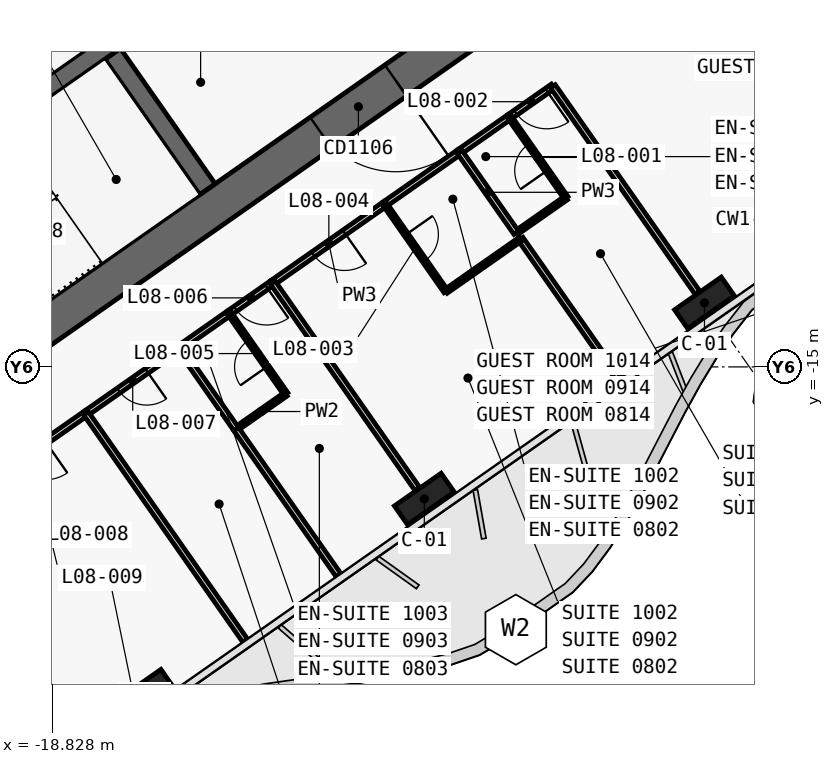
"""IFC4 building model, lengths in metres.
Left out: names, types, materials, properties, quantities, classifications, styles, units other than length and angle.
Written with IfcOpenShell. Run it as: python <this file> out.ifc"""

import sys

from ifc_helpers import new_model, si_unit, direction, frame, frame_2d, origin, origin_2d, place, context, subcontext, project, spatial, polyline, rectangle, outline, extrude, element, fill, save


model = new_model("IFC4")
c1 = context("Model", 3, precision=1e-05, world=origin(), true_north=direction((0.0, 1.0)))
c2 = subcontext(c1, "Body", "Model", "MODEL_VIEW")
j1 = project(units=[si_unit("LENGTHUNIT", "METRE"), si_unit("PLANEANGLEUNIT", "RADIAN")], contexts=[c1])
p1 = place(None, origin())
s1 = spatial("IfcSite", under=j1, at=p1, CompositionType="ELEMENT")
p2 = place(p1, origin())
s2 = spatial("IfcBuilding", under=s1, at=p2, CompositionType="ELEMENT")
p3 = place(p2, frame((0.0, 0.0, 54.5)))
s3 = spatial("IfcBuildingStorey", under=s2, at=p3, CompositionType="ELEMENT", Elevation=54.5)
p4 = place(p3, frame((0.037, 11.867, 0.0), z_axis=(0.0, 0.0, 1.0), x_axis=(-0.819155306259, -0.573571777746, 0.0)))
e1 = element("IfcWall", 1, at=p4, inside=s3, PredefinedType="SHEAR", context=c2, shape_type="SweptSolid", body=[
    extrude(outline(polyline([(33.837, 0.5), (0.7, 0.5), (0.0, -0.5), (33.837, -0.5), (33.837, 0.5)])), origin(), (0.0, 0.0, 1.0), 3.6),
])
p5 = place(p3, frame((0.037, -0.585, 0.0), z_axis=(0.0, 0.0, 1.0), x_axis=(-0.819157152511, -0.573569140985, 0.0)))
e2 = element("IfcWall", 2, at=p5, inside=s3, PredefinedType="SHEAR", context=c2, shape_type="SweptSolid", body=[
    extrude(outline(polyline([(26.695, 0.5), (0.7, 0.5), (0.0, -0.5), (26.695, -0.5), (26.695, 0.5)])), origin(), (0.0, 0.0, 1.0), 3.6),
])
p6 = place(p5, frame((2.995, 0.0, 0.0)))
e3 = element("IfcOpeningElement", 3, at=p6, cuts=e2, PredefinedType="OPENING", context=c2, shape_type="SweptSolid", body=[
    extrude(rectangle(XDim=2.4, YDim=2.1, at=frame_2d((1.2, 1.05))), frame((0.0, 0.51, 0.0), z_axis=(0.0, -1.0, 0.0), x_axis=(1.0, 0.0, 0.0)), (0.0, 0.0, 1.0), 1.02),
])
p7 = place(p5, frame((11.995, 0.0, 0.0)))
e4 = element("IfcOpeningElement", 4, at=p7, cuts=e2, PredefinedType="OPENING", context=c2, shape_type="SweptSolid", body=[
    extrude(rectangle(XDim=2.4, YDim=2.1, at=frame_2d((1.2, 1.05))), frame((0.0, 0.51, 0.0), z_axis=(0.0, -1.0, 0.0), x_axis=(1.0, 0.0, 0.0)), (0.0, 0.0, 1.0), 1.02),
])
p8 = place(p3, frame((-14.745, -10.324, 0.0), z_axis=(0.0, 0.0, 1.0), x_axis=(-0.57356780395, 0.819158088694, 0.0)))
e5 = element("IfcWall", 5, at=p8, inside=s3, PredefinedType="SHEAR", context=c2, shape_type="SweptSolid", body=[
    extrude(outline(polyline([(4.35, 0.25), (0.0, 0.25), (0.0, -0.25), (4.35, -0.25), (4.35, 0.25)])), origin(), (0.0, 0.0, 1.0), 3.6),
])
p9 = place(p3, frame((-2.638, 3.768, 0.0), z_axis=(0.0, 0.0, 1.0), x_axis=(-0.819148977158, -0.573580816643, 0.0)))
e6 = element("IfcWall", 6, at=p9, inside=s3, PredefinedType="SHEAR", context=c2, shape_type="SweptSolid", body=[
    extrude(outline(polyline([(26.0, 0.25), (0.0, 0.25), (0.0, -0.25), (26.0, -0.25), (26.0, 0.25)])), origin(), (0.0, 0.0, 1.0), 3.6),
])
p10 = place(p9, frame((1.169, 0.0, 0.0)))
e7 = element("IfcOpeningElement", 7, at=p10, cuts=e6, PredefinedType="OPENING", context=c2, shape_type="SweptSolid", body=[
    extrude(rectangle(XDim=1.1, YDim=2.1, at=frame_2d((0.55, 1.05))), frame((0.0, 0.26, 0.0), z_axis=(0.0, -1.0, 0.0), x_axis=(1.0, 0.0, 0.0)), (0.0, 0.0, 1.0), 0.52),
])
p11 = place(p9, frame((3.206, 0.0, 0.0)))
e8 = element("IfcOpeningElement", 8, at=p11, cuts=e6, PredefinedType="OPENING", context=c2, shape_type="SweptSolid", body=[
    extrude(rectangle(XDim=1.1, YDim=2.1, at=frame_2d((0.55, 1.05))), frame((0.0, 0.26, 0.0), z_axis=(0.0, -1.0, 0.0), x_axis=(1.0, 0.0, 0.0)), (0.0, 0.0, 1.0), 0.52),
])
p12 = place(p9, frame((5.244, 0.0, 0.0)))
e9 = element("IfcOpeningElement", 9, at=p12, cuts=e6, PredefinedType="OPENING", context=c2, shape_type="SweptSolid", body=[
    extrude(rectangle(XDim=1.1, YDim=2.1, at=frame_2d((0.55, 1.05))), frame((0.0, 0.26, 0.0), z_axis=(0.0, -1.0, 0.0), x_axis=(1.0, 0.0, 0.0)), (0.0, 0.0, 1.0), 0.52),
])
p13 = place(p9, frame((7.281, 0.0, 0.0)))
e10 = element("IfcOpeningElement", 10, at=p13, cuts=e6, PredefinedType="OPENING", context=c2, shape_type="SweptSolid", body=[
    extrude(rectangle(XDim=1.1, YDim=2.1, at=frame_2d((0.55, 1.05))), frame((0.0, 0.26, 0.0), z_axis=(0.0, -1.0, 0.0), x_axis=(1.0, 0.0, 0.0)), (0.0, 0.0, 1.0), 0.52),
])
p14 = place(p9, frame((9.688, 0.0, 0.0)))
e11 = element("IfcOpeningElement", 11, at=p14, cuts=e6, PredefinedType="OPENING", context=c2, shape_type="SweptSolid", body=[
    extrude(rectangle(XDim=1.1, YDim=2.1, at=frame_2d((0.55, 1.05))), frame((0.0, 0.26, 0.0), z_axis=(0.0, -1.0, 0.0), x_axis=(1.0, 0.0, 0.0)), (0.0, 0.0, 1.0), 0.52),
])
p15 = place(p9, frame((11.863, 0.0, 0.0)))
e12 = element("IfcOpeningElement", 12, at=p15, cuts=e6, PredefinedType="OPENING", context=c2, shape_type="SweptSolid", body=[
    extrude(rectangle(XDim=1.1, YDim=2.1, at=frame_2d((0.55, 1.05))), frame((0.0, 0.26, 0.0), z_axis=(0.0, -1.0, 0.0), x_axis=(1.0, 0.0, 0.0)), (0.0, 0.0, 1.0), 0.52),
])
p16 = place(p9, frame((14.038, 0.0, 0.0)))
e13 = element("IfcOpeningElement", 13, at=p16, cuts=e6, PredefinedType="OPENING", context=c2, shape_type="SweptSolid", body=[
    extrude(rectangle(XDim=1.1, YDim=2.1, at=frame_2d((0.55, 1.05))), frame((0.0, 0.26, 0.0), z_axis=(0.0, -1.0, 0.0), x_axis=(1.0, 0.0, 0.0)), (0.0, 0.0, 1.0), 0.52),
])
p17 = place(p9, frame((16.212, 0.0, 0.0)))
e14 = element("IfcOpeningElement", 14, at=p17, cuts=e6, PredefinedType="OPENING", context=c2, shape_type="SweptSolid", body=[
    extrude(rectangle(XDim=1.1, YDim=2.1, at=frame_2d((0.55, 1.05))), frame((0.0, 0.26, 0.0), z_axis=(0.0, -1.0, 0.0), x_axis=(1.0, 0.0, 0.0)), (0.0, 0.0, 1.0), 0.52),
])
for number, where, z_axis, x_axis in (
    (15, (-1.665, -13.313, 0.0), (0.0, 0.0, 1.0), (-0.819, -0.574, 0.0)),
    (16, (-9.038, -18.475, 0.0), (0.0, 0.0, 1.0), (-0.819, -0.574, 0.0)),
    (17, (-16.41, -23.637, 0.0), (0.0, 0.0, 1.0), (-0.819, -0.574, 0.0)),
):
    element("IfcColumn", number, at=place(p3, frame(where, z_axis=z_axis, x_axis=x_axis)), inside=s3, PredefinedType="COLUMN", context=c2, shape_type="SweptSolid", body=[
        extrude(rectangle(XDim=1.5, YDim=0.6, at=origin_2d()), origin(), (0.0, 0.0, 1.0), 3.6),
    ])
p18 = place(p3, frame((-5.652, -7.62, 0.0), z_axis=(0.0, 0.0, 1.0), x_axis=(-0.819207359301, -0.573497430219, 0.0)))
e18 = element("IfcWall", 18, at=p18, inside=s3, PredefinedType="PARTITIONING", context=c2, shape_type="SweptSolid", body=[
    extrude(rectangle(XDim=1.401, YDim=0.15, at=frame_2d((0.7, 0.0))), origin(), (0.0, 0.0, 1.0), 2.6),
])
p19 = place(p18, frame((0.2, 0.0, 0.0)))
e19 = element("IfcOpeningElement", 19, at=p19, cuts=e18, PredefinedType="OPENING", context=c2, shape_type="SweptSolid", body=[
    extrude(rectangle(XDim=1.0, YDim=2.1, at=frame_2d((0.5, 1.05))), frame((0.0, 0.085, 0.0), z_axis=(0.0, -1.0, 0.0), x_axis=(1.0, 0.0, 0.0)), (0.0, 0.0, 1.0), 0.17),
])
p20 = place(p3, frame((-6.797, -8.421, 0.0), z_axis=(0.0, 0.0, 1.0), x_axis=(-0.8190674132, -0.573697283098, 0.0)))
e20 = element("IfcWall", 20, at=p20, inside=s3, PredefinedType="PARTITIONING", context=c2, shape_type="SweptSolid", body=[
    extrude(rectangle(XDim=1.604, YDim=0.15, at=frame_2d((0.802, 0.0))), origin(), (0.0, 0.0, 1.0), 3.32),
])
p21 = place(p3, frame((-10.074, -10.716, 0.0), z_axis=(0.0, 0.0, 1.0), x_axis=(-0.819145961204, -0.573585123798, 0.0)))
e21 = element("IfcWall", 21, at=p21, inside=s3, PredefinedType="PARTITIONING", context=c2, shape_type="SweptSolid", body=[
    extrude(rectangle(XDim=3.603, YDim=0.15, at=frame_2d((1.802, 0.0))), origin(), (0.0, 0.0, 1.0), 2.6),
])
p22 = place(p21, frame((1.301, 0.0, 0.0)))
e22 = element("IfcOpeningElement", 22, at=p22, cuts=e21, PredefinedType="OPENING", context=c2, shape_type="SweptSolid", body=[
    extrude(rectangle(XDim=1.0, YDim=2.1, at=frame_2d((0.5, 1.05))), frame((0.0, 0.085, 0.0), z_axis=(0.0, -1.0, 0.0), x_axis=(1.0, 0.0, 0.0)), (0.0, 0.0, 1.0), 0.17),
])
p23 = place(p3, frame((-8.107, -9.339, 0.0), z_axis=(0.0, 0.0, 1.0), x_axis=(-0.819146032251, -0.573585022335, 0.0)))
e23 = element("IfcWall", 23, at=p23, inside=s3, PredefinedType="PARTITIONING", context=c2, shape_type="SweptSolid", body=[
    extrude(rectangle(XDim=2.404, YDim=0.15, at=frame_2d((1.202, 0.0))), origin(), (0.0, 0.0, 1.0), 3.32),
])
p24 = place(p3, frame((-13.022, -12.781, 0.0), z_axis=(0.0, 0.0, 1.0), x_axis=(-0.81914197737, -0.573590813132, 0.0)))
e24 = element("IfcWall", 24, at=p24, inside=s3, PredefinedType="PARTITIONING", context=c2, shape_type="SweptSolid", body=[
    extrude(rectangle(XDim=1.403, YDim=0.15, at=frame_2d((0.701, 0.0))), origin(), (0.0, 0.0, 1.0), 2.6),
])
p25 = place(p24, frame((0.202, 0.0, 0.0)))
e25 = element("IfcOpeningElement", 25, at=p25, cuts=e24, PredefinedType="OPENING", context=c2, shape_type="SweptSolid", body=[
    extrude(rectangle(XDim=1.0, YDim=2.1, at=frame_2d((0.5, 1.05))), frame((0.0, 0.085, 0.0), z_axis=(0.0, -1.0, 0.0), x_axis=(1.0, 0.0, 0.0)), (0.0, 0.0, 1.0), 0.17),
])
p26 = place(p3, frame((-14.169, -13.584, 0.0), z_axis=(0.0, 0.0, 1.0), x_axis=(-0.819189013667, -0.573523634986, 0.0)))
e26 = element("IfcWall", 26, at=p26, inside=s3, PredefinedType="PARTITIONING", context=c2, shape_type="SweptSolid", body=[
    extrude(rectangle(XDim=1.604, YDim=0.15, at=frame_2d((0.802, 0.0))), origin(), (0.0, 0.0, 1.0), 3.32),
])
p27 = place(p3, frame((-15.48, -14.501, 0.0), z_axis=(0.0, 0.0, 1.0), x_axis=(-0.819193738533, -0.573516886193, 0.0)))
e27 = element("IfcWall", 27, at=p27, inside=s3, PredefinedType="PARTITIONING", context=c2, shape_type="SweptSolid", body=[
    extrude(rectangle(XDim=3.004, YDim=0.15, at=frame_2d((1.502, 0.0))), origin(), (0.0, 0.0, 1.0), 3.32),
])
p28 = place(p27, frame((1.052, 0.0, 0.0)))
e28 = element("IfcOpeningElement", 28, at=p28, cuts=e27, PredefinedType="OPENING", context=c2, shape_type="SweptSolid", body=[
    extrude(rectangle(XDim=0.9, YDim=2.1, at=frame_2d((0.45, 1.05))), frame((0.0, 0.085, 0.0), z_axis=(0.0, -1.0, 0.0), x_axis=(1.0, 0.0, 0.0)), (0.0, 0.0, 1.0), 0.17),
])
p29 = place(p3, frame((-17.937, -16.222, 0.0), z_axis=(0.0, 0.0, 1.0), x_axis=(-0.819145961204, -0.573585123798, 0.0)))
e29 = element("IfcWall", 29, at=p29, inside=s3, PredefinedType="PARTITIONING", context=c2, shape_type="SweptSolid", body=[
    extrude(rectangle(XDim=3.603, YDim=0.15, at=frame_2d((1.802, 0.0))), origin(), (0.0, 0.0, 1.0), 2.6),
])
p30 = place(p29, frame((1.302, 0.0, 0.0)))
e30 = element("IfcOpeningElement", 30, at=p30, cuts=e29, PredefinedType="OPENING", context=c2, shape_type="SweptSolid", body=[
    extrude(rectangle(XDim=1.0, YDim=2.1, at=frame_2d((0.5, 1.05))), frame((0.0, 0.085, 0.0), z_axis=(0.0, -1.0, 0.0), x_axis=(1.0, 0.0, 0.0)), (0.0, 0.0, 1.0), 0.17),
])
p31 = place(p3, frame((-1.849, -13.051, 0.0), z_axis=(0.0, 0.0, 1.0), x_axis=(-0.573575988258, 0.819152358047, 0.0)))
e31 = element("IfcWall", 31, at=p31, inside=s3, PredefinedType="PARTITIONING", context=c2, shape_type="SweptSolid", body=[
    extrude(rectangle(XDim=6.632, YDim=0.15, at=frame_2d((3.316, 0.0))), origin(), (0.0, 0.0, 1.0), 2.6),
])
p32 = place(p3, frame((-6.617, -11.471, 0.0), z_axis=(0.0, 0.0, 1.0), x_axis=(0.819131543282, 0.57360571371, 0.0)))
e32 = element("IfcWall", 32, at=p32, inside=s3, PredefinedType="PARTITIONING", context=c2, shape_type="SweptSolid", body=[
    extrude(rectangle(XDim=1.6, YDim=0.12, at=frame_2d((0.8, 0.0))), origin(), (0.0, 0.0, 1.0), 3.32),
])
p33 = place(p3, frame((-5.306, -10.552, 0.0), z_axis=(0.0, 0.0, 1.0), x_axis=(-0.573537965655, 0.819178980414, 0.0)))
e33 = element("IfcWall", 33, at=p33, inside=s3, PredefinedType="PARTITIONING", context=c2, shape_type="SweptSolid", body=[
    extrude(rectangle(XDim=2.6, YDim=0.12, at=frame_2d((1.3, 0.0))), origin(), (0.0, 0.0, 1.0), 3.32),
])
p34 = place(p33, frame((0.875, 0.0, 0.0)))
e34 = element("IfcOpeningElement", 34, at=p34, cuts=e33, PredefinedType="OPENING", context=c2, shape_type="SweptSolid", body=[
    extrude(rectangle(XDim=0.85, YDim=2.05, at=frame_2d((0.425, 1.025))), frame((0.0, 0.07, 0.0), z_axis=(0.0, -1.0, 0.0), x_axis=(1.0, 0.0, 0.0)), (0.0, 0.0, 1.0), 0.14),
])
p35 = place(p3, frame((-3.922, -15.32, 0.0), z_axis=(0.0, 0.0, 1.0), x_axis=(-0.573556991349, 0.819165659482, 0.0)))
e35 = element("IfcWall", 35, at=p35, inside=s3, PredefinedType="PARTITIONING", context=c2, shape_type="SweptSolid", body=[
    extrude(rectangle(XDim=4.501, YDim=0.15, at=frame_2d((2.25, 0.0))), origin(), (0.0, 0.0, 1.0), 2.5),
])
p36 = place(p3, frame((-6.618, -11.47, 0.0), z_axis=(0.0, 0.0, 1.0), x_axis=(-0.573537965655, 0.819178980414, 0.0)))
e36 = element("IfcWall", 36, at=p36, inside=s3, PredefinedType="PARTITIONING", context=c2, shape_type="SweptSolid", body=[
    extrude(rectangle(XDim=2.6, YDim=0.15, at=frame_2d((1.3, 0.0))), origin(), (0.0, 0.0, 1.0), 3.32),
])
p37 = place(p3, frame((-10.076, -10.718, 0.0), z_axis=(0.0, 0.0, 1.0), x_axis=(0.573550118428, -0.819170471667, 0.0)))
e37 = element("IfcWall", 37, at=p37, inside=s3, PredefinedType="PARTITIONING", context=c2, shape_type="SweptSolid", body=[
    extrude(rectangle(XDim=2.8, YDim=0.12, at=frame_2d((1.4, 0.0))), origin(), (0.0, 0.0, 1.0), 3.32),
])
p38 = place(p37, frame((0.975, 0.0, 0.0)))
e38 = element("IfcOpeningElement", 38, at=p38, cuts=e37, PredefinedType="OPENING", context=c2, shape_type="SweptSolid", body=[
    extrude(rectangle(XDim=0.85, YDim=2.05, at=frame_2d((0.425, 1.025))), frame((0.0, 0.07, 0.0), z_axis=(0.0, -1.0, 0.0), x_axis=(1.0, 0.0, 0.0)), (0.0, 0.0, 1.0), 0.14),
])
p39 = place(p3, frame((-8.469, -13.011, 0.0), z_axis=(0.0, 0.0, 1.0), x_axis=(0.819141114317, 0.573592045652, 0.0)))
e39 = element("IfcWall", 39, at=p39, inside=s3, PredefinedType="PARTITIONING", context=c2, shape_type="SweptSolid", body=[
    extrude(rectangle(XDim=2.4, YDim=0.12, at=frame_2d((1.2, 0.0))), origin(), (0.0, 0.0, 1.0), 3.32),
])
p40 = place(p3, frame((-9.221, -18.213, 0.0), z_axis=(0.0, 0.0, 1.0), x_axis=(-0.573556251799, 0.819166177294, 0.0)))
e40 = element("IfcWall", 40, at=p40, inside=s3, PredefinedType="PARTITIONING", context=c2, shape_type="SweptSolid", body=[
    extrude(rectangle(XDim=6.63, YDim=0.15, at=frame_2d((3.315, 0.0))), origin(), (0.0, 0.0, 1.0), 2.6),
])
p41 = place(p3, frame((-13.99, -16.633, 0.0), z_axis=(0.0, 0.0, 1.0), x_axis=(0.819131543282, 0.57360571371, 0.0)))
e41 = element("IfcWall", 41, at=p41, inside=s3, PredefinedType="PARTITIONING", context=c2, shape_type="SweptSolid", body=[
    extrude(rectangle(XDim=1.6, YDim=0.12, at=frame_2d((0.8, 0.0))), origin(), (0.0, 0.0, 1.0), 3.32),
])
p42 = place(p3, frame((-12.679, -15.714, 0.0), z_axis=(0.0, 0.0, 1.0), x_axis=(-0.573537965655, 0.819178980414, 0.0)))
e42 = element("IfcWall", 42, at=p42, inside=s3, PredefinedType="PARTITIONING", context=c2, shape_type="SweptSolid", body=[
    extrude(rectangle(XDim=2.6, YDim=0.12, at=frame_2d((1.3, 0.0))), origin(), (0.0, 0.0, 1.0), 3.32),
])
p43 = place(p42, frame((0.875, 0.0, 0.0)))
e43 = element("IfcOpeningElement", 43, at=p43, cuts=e42, PredefinedType="OPENING", context=c2, shape_type="SweptSolid", body=[
    extrude(rectangle(XDim=0.85, YDim=2.05, at=frame_2d((0.425, 1.025))), frame((0.0, 0.07, 0.0), z_axis=(0.0, -1.0, 0.0), x_axis=(1.0, 0.0, 0.0)), (0.0, 0.0, 1.0), 0.14),
])
p44 = place(p3, frame((-11.294, -20.482, 0.0), z_axis=(0.0, 0.0, 1.0), x_axis=(-0.573559978739, 0.819163567787, 0.0)))
e44 = element("IfcWall", 44, at=p44, inside=s3, PredefinedType="PARTITIONING", context=c2, shape_type="SweptSolid", body=[
    extrude(rectangle(XDim=4.699, YDim=0.15, at=frame_2d((2.349, 0.0))), origin(), (0.0, 0.0, 1.0), 2.5),
])
p45 = place(p3, frame((-13.99, -16.632, 0.0), z_axis=(0.0, 0.0, 1.0), x_axis=(-0.573582085028, 0.819148089014, 0.0)))
e45 = element("IfcWall", 45, at=p45, inside=s3, PredefinedType="PARTITIONING", context=c2, shape_type="SweptSolid", body=[
    extrude(rectangle(XDim=2.6, YDim=0.15, at=frame_2d((1.3, 0.0))), origin(), (0.0, 0.0, 1.0), 3.32),
])
p46 = place(p3, frame((-13.752, -22.203, 0.0), z_axis=(0.0, 0.0, 1.0), x_axis=(-0.573594765376, 0.819139209862, 0.0)))
e46 = element("IfcWall", 46, at=p46, inside=s3, PredefinedType="PARTITIONING", context=c2, shape_type="SweptSolid", body=[
    extrude(rectangle(XDim=7.3, YDim=0.15, at=frame_2d((3.65, 0.0))), origin(), (0.0, 0.0, 1.0), 2.5),
])
p47 = place(p3, frame((-18.667, -25.645, 0.0), z_axis=(0.0, 0.0, 1.0), x_axis=(-0.573589807488, 0.819142681555, 0.0)))
e47 = element("IfcWall", 47, at=p47, inside=s3, PredefinedType="PARTITIONING", context=c2, shape_type="SweptSolid", body=[
    extrude(rectangle(XDim=4.499, YDim=0.15, at=frame_2d((2.25, 0.0))), origin(), (0.0, 0.0, 1.0), 2.5),
])
p48 = place(p7, origin())
e48 = element("IfcDoor", 48, at=p48, inside=s3, OperationType="DOUBLE_DOOR_SINGLE_SWING", PredefinedType="DOOR", context=c2, shape_type="SweptSolid", body=[
    extrude(rectangle(XDim=2.4, YDim=2.1, at=frame_2d((1.2, 1.05))), frame((0.0, 0.025, 0.0), z_axis=(0.0, -1.0, 0.0), x_axis=(1.0, 0.0, 0.0)), (0.0, 0.0, 1.0), 0.05),
])
fill(e4, e48)
p49 = place(p34, origin())
e49 = element("IfcDoor", 49, at=p49, inside=s3, OperationType="SINGLE_SWING_RIGHT", PredefinedType="DOOR", context=c2, shape_type="SweptSolid", body=[
    extrude(rectangle(XDim=0.85, YDim=2.05, at=frame_2d((0.425, 1.025))), frame((0.0, 0.025, 0.0), z_axis=(0.0, -1.0, 0.0), x_axis=(1.0, 0.0, 0.0)), (0.0, 0.0, 1.0), 0.05),
])
fill(e34, e49)
p50 = place(p19, origin())
e50 = element("IfcDoor", 50, at=p50, inside=s3, OperationType="SINGLE_SWING_LEFT", PredefinedType="DOOR", context=c2, shape_type="SweptSolid", body=[
    extrude(rectangle(XDim=1.0, YDim=2.1, at=frame_2d((0.5, 1.05))), frame((0.0, 0.025, 0.0), z_axis=(0.0, -1.0, 0.0), x_axis=(1.0, 0.0, 0.0)), (0.0, 0.0, 1.0), 0.05),
])
fill(e19, e50)
p51 = place(p38, origin())
e51 = element("IfcDoor", 51, at=p51, inside=s3, OperationType="SINGLE_SWING_LEFT", PredefinedType="DOOR", context=c2, shape_type="SweptSolid", body=[
    extrude(rectangle(XDim=0.85, YDim=2.05, at=frame_2d((0.425, 1.025))), frame((0.0, 0.025, 0.0), z_axis=(0.0, -1.0, 0.0), x_axis=(1.0, 0.0, 0.0)), (0.0, 0.0, 1.0), 0.05),
])
fill(e38, e51)
p52 = place(p22, origin())
e52 = element("IfcDoor", 52, at=p52, inside=s3, OperationType="SINGLE_SWING_RIGHT", PredefinedType="DOOR", context=c2, shape_type="SweptSolid", body=[
    extrude(rectangle(XDim=1.0, YDim=2.1, at=frame_2d((0.5, 1.05))), frame((0.0, 0.025, 0.0), z_axis=(0.0, -1.0, 0.0), x_axis=(1.0, 0.0, 0.0)), (0.0, 0.0, 1.0), 0.05),
])
fill(e22, e52)
p53 = place(p43, origin())
e53 = element("IfcDoor", 53, at=p53, inside=s3, OperationType="SINGLE_SWING_RIGHT", PredefinedType="DOOR", context=c2, shape_type="SweptSolid", body=[
    extrude(rectangle(XDim=0.85, YDim=2.05, at=frame_2d((0.425, 1.025))), frame((0.0, 0.025, 0.0), z_axis=(0.0, -1.0, 0.0), x_axis=(1.0, 0.0, 0.0)), (0.0, 0.0, 1.0), 0.05),
])
fill(e43, e53)
p54 = place(p25, origin())
e54 = element("IfcDoor", 54, at=p54, inside=s3, OperationType="SINGLE_SWING_LEFT", PredefinedType="DOOR", context=c2, shape_type="SweptSolid", body=[
    extrude(rectangle(XDim=1.0, YDim=2.1, at=frame_2d((0.5, 1.05))), frame((0.0, 0.025, 0.0), z_axis=(0.0, -1.0, 0.0), x_axis=(1.0, 0.0, 0.0)), (0.0, 0.0, 1.0), 0.05),
])
fill(e25, e54)
p55 = place(p28, origin())
e55 = element("IfcDoor", 55, at=p55, inside=s3, OperationType="SINGLE_SWING_RIGHT", PredefinedType="DOOR", context=c2, shape_type="SweptSolid", body=[
    extrude(rectangle(XDim=0.9, YDim=2.1, at=frame_2d((0.45, 1.05))), frame((0.0, 0.025, 0.0), z_axis=(0.0, -1.0, 0.0), x_axis=(1.0, 0.0, 0.0)), (0.0, 0.0, 1.0), 0.05),
])
fill(e28, e55)
save(model, sys.argv[1])
